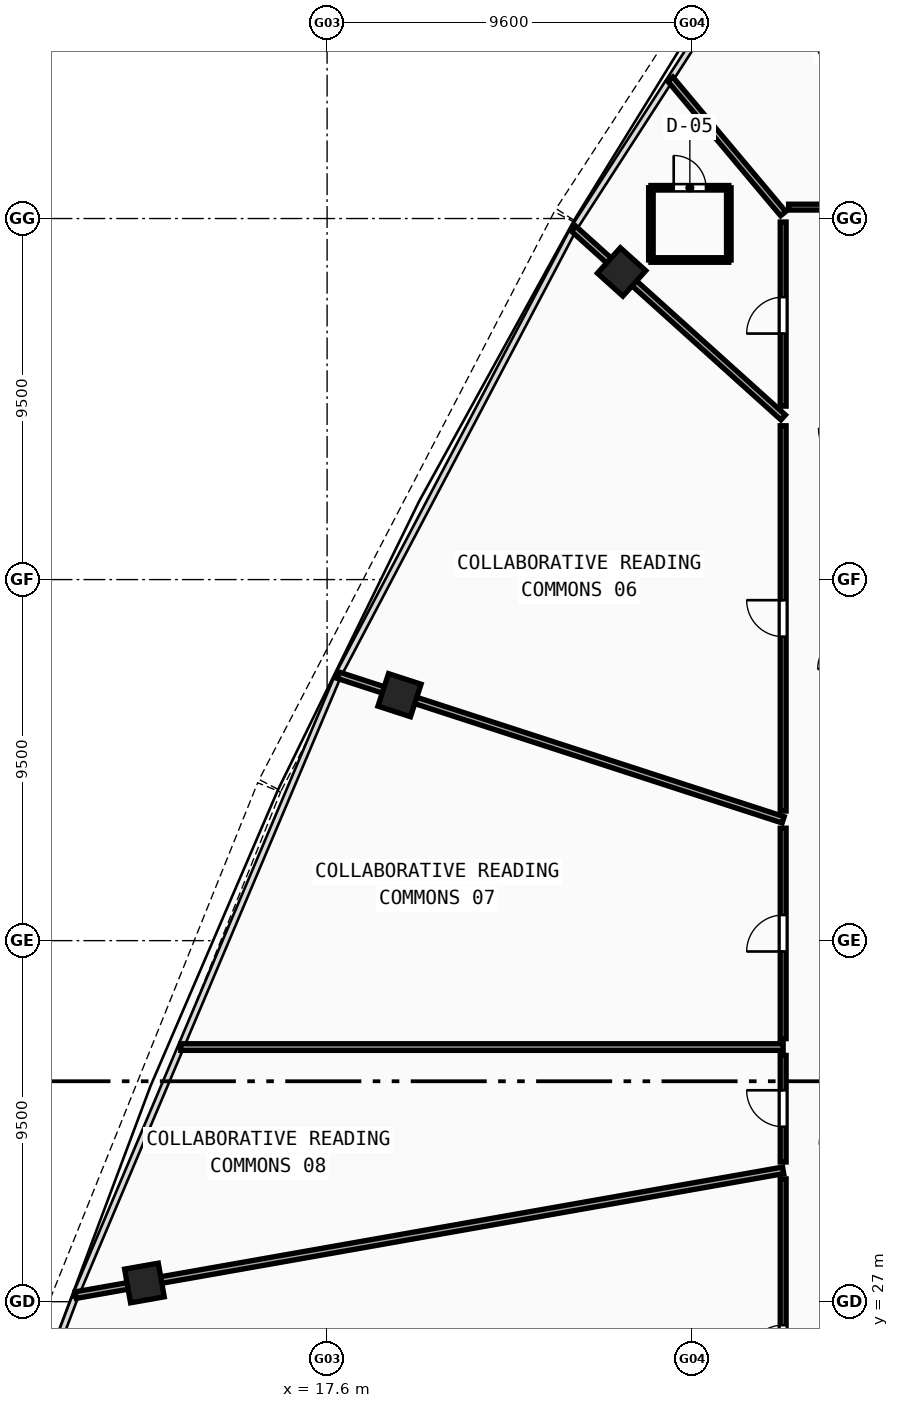
"""IFC4 building model, lengths in metres.
Left out: names, types, materials, properties, quantities, classifications, styles, units other than length and angle.
Written with IfcOpenShell. Run it as: python <this file> out.ifc"""

import sys

from ifc_helpers import new_model, si_unit, direction, frame, frame_2d, origin, origin_with_axes, origin_2d, place, context, subcontext, project, spatial, rectangle, hollow_rectangle, extrude, source, transform, mapped, element, fill, save


model = new_model("IFC4")
c1 = context("Model", 3, precision=1e-05, world=origin(), true_north=direction((0.0, 1.0)))
c2 = subcontext(c1, "Body", "Model", "MODEL_VIEW")
j1 = project(units=[si_unit("LENGTHUNIT", "METRE"), si_unit("PLANEANGLEUNIT", "RADIAN")], contexts=[c1])
p1 = place(None, origin())
s1 = spatial("IfcSite", under=j1, at=p1, CompositionType="ELEMENT")
p2 = place(p1, origin())
s2 = spatial("IfcBuilding", under=s1, at=p2, CompositionType="ELEMENT")
p3 = place(p2, frame((0.0, 0.0, 207.56)))
s3 = spatial("IfcBuildingStorey", under=s2, at=p3, CompositionType="ELEMENT", Elevation=207.56)
m1 = source(origin(), c2, "Body", "SweptSolid", [
    extrude(hollow_rectangle(XDim=0.9, YDim=0.9, WallThickness=0.036, at=origin_2d()), origin(), (0.0, 0.0, 1.0), 3.8),
])
for number, where, z_axis, x_axis in (
    (1, (25.349, 54.095, -0.26), (0.0, 0.0, 1.0), (-0.669, -0.743, 0.0)),
    (2, (19.505, 42.958, -0.26), (0.0, 0.0, 1.0), (-0.309, -0.951, 0.0)),
    (3, (12.793, 27.492, -0.26), (0.0, 0.0, 1.0), (0.174, -0.985, 0.0)),
):
    element("IfcColumn", number, at=place(p3, frame(where, z_axis=z_axis, x_axis=x_axis)), inside=s3, PredefinedType="COLUMN", context=c2, shape_type="MappedRepresentation", body=[
        mapped(m1, transform((0.0, 0.0, 0.0), scale=1.0)),
    ])
p4 = place(p3, frame((29.6, 55.628, 0.0), z_axis=(0.0, 0.0, 1.0), x_axis=(-0.642810353623, 0.766025358115, 0.0)))
e4 = element("IfcWall", 4, at=p4, inside=s3, PredefinedType="PARTITIONING", context=c2, shape_type="SweptSolid", body=[
    extrude(rectangle(XDim=4.621, YDim=0.175, at=frame_2d((2.31, 0.0))), origin(), (0.0, 0.0, 1.0), 2.89),
])
p5 = place(p3, frame((29.6, 50.267, 0.0), z_axis=(0.0, 0.0, 1.0), x_axis=(-0.743143583897, 0.669131985271, 0.0)))
e5 = element("IfcWall", 5, at=p5, inside=s3, PredefinedType="PARTITIONING", context=c2, shape_type="SweptSolid", body=[
    extrude(rectangle(XDim=7.419, YDim=0.175, at=frame_2d((3.709, 0.0))), origin(), (0.0, 0.0, 1.0), 2.89),
])
p6 = place(p3, frame((29.6, 39.678, 0.0), z_axis=(0.0, 0.0, 1.0), x_axis=(-0.951057676857, 0.309013422511, 0.0)))
e6 = element("IfcWall", 6, at=p6, inside=s3, PredefinedType="PARTITIONING", context=c2, shape_type="SweptSolid", body=[
    extrude(rectangle(XDim=12.31, YDim=0.175, at=frame_2d((6.155, 0.0))), origin(), (0.0, 0.0, 1.0), 2.89),
])
p7 = place(p3, frame((29.6, 33.7, 0.0), z_axis=(0.0, 0.0, 1.0), x_axis=(-1.0, 0.0, 0.0)))
e7 = element("IfcWall", 7, at=p7, inside=s3, PredefinedType="PARTITIONING", context=c2, shape_type="SweptSolid", body=[
    extrude(rectangle(XDim=15.851, YDim=0.175, at=frame_2d((7.925, 0.0))), origin(), (0.0, 0.0, 1.0), 2.89),
])
p8 = place(p3, frame((29.6, 30.456, 0.0), z_axis=(0.0, 0.0, 1.0), x_axis=(-0.984807864876, -0.173647543254, 0.0)))
e8 = element("IfcWall", 8, at=p8, inside=s3, PredefinedType="PARTITIONING", context=c2, shape_type="SweptSolid", body=[
    extrude(rectangle(XDim=18.902, YDim=0.175, at=frame_2d((9.451, 0.0))), origin(), (0.0, 0.0, 1.0), 2.89),
])
p9 = place(p3, frame((29.6, 21.8, 0.0), z_axis=(0.0, 0.0, 1.0), x_axis=(0.0, 1.0, 0.0)))
e9 = element("IfcWall", 9, at=p9, inside=s3, PredefinedType="PARTITIONING", context=c2, shape_type="SweptSolid", body=[
    extrude(rectangle(XDim=8.432, YDim=0.155, at=frame_2d((4.216, 0.0))), origin(), (0.0, 0.0, 1.0), 3.14),
])
p10 = place(p9, frame((3.623, 0.0, 0.0)))
e10 = element("IfcOpeningElement", 10, at=p10, cuts=e9, PredefinedType="OPENING", context=c2, shape_type="SweptSolid", body=[
    extrude(rectangle(XDim=0.96, YDim=2.12, at=frame_2d((0.48, 1.06))), frame((0.0, 0.087, 0.0), z_axis=(0.0, -1.0, 0.0), x_axis=(1.0, 0.0, 0.0)), (0.0, 0.0, 1.0), 0.175),
])
p11 = place(p3, frame((29.6, 30.675, 0.0), z_axis=(0.0, 0.0, 1.0), x_axis=(0.0, 1.0, 0.0)))
e11 = element("IfcWall", 11, at=p11, inside=s3, PredefinedType="PARTITIONING", context=c2, shape_type="SweptSolid", body=[
    extrude(rectangle(XDim=2.805, YDim=0.155, at=frame_2d((1.402, 0.0))), origin(), (0.0, 0.0, 1.0), 3.54),
])
p12 = place(p11, frame((0.927, 0.0, 0.0)))
e12 = element("IfcOpeningElement", 12, at=p12, cuts=e11, PredefinedType="OPENING", context=c2, shape_type="SweptSolid", body=[
    extrude(rectangle(XDim=0.96, YDim=2.12, at=frame_2d((0.48, 1.06))), frame((0.0, 0.087, 0.0), z_axis=(0.0, -1.0, 0.0), x_axis=(1.0, 0.0, 0.0)), (0.0, 0.0, 1.0), 0.175),
])
p13 = place(p3, frame((29.6, 33.92, 0.0), z_axis=(0.0, 0.0, 1.0), x_axis=(0.0, 1.0, 0.0)))
e13 = element("IfcWall", 13, at=p13, inside=s3, PredefinedType="PARTITIONING", context=c2, shape_type="SweptSolid", body=[
    extrude(rectangle(XDim=5.539, YDim=0.155, at=frame_2d((2.77, 0.0))), origin(), (0.0, 0.0, 1.0), 3.14),
])
p14 = place(p13, frame((2.294, 0.0, 0.0)))
e14 = element("IfcOpeningElement", 14, at=p14, cuts=e13, PredefinedType="OPENING", context=c2, shape_type="SweptSolid", body=[
    extrude(rectangle(XDim=0.96, YDim=2.12, at=frame_2d((0.48, 1.06))), frame((0.0, 0.087, 0.0), z_axis=(0.0, -1.0, 0.0), x_axis=(1.0, 0.0, 0.0)), (0.0, 0.0, 1.0), 0.175),
])
p15 = place(p3, frame((29.6, 39.91, 0.0), z_axis=(0.0, 0.0, 1.0), x_axis=(0.0, 1.0, 0.0)))
e15 = element("IfcWall", 15, at=p15, inside=s3, PredefinedType="PARTITIONING", context=c2, shape_type="SweptSolid", body=[
    extrude(rectangle(XDim=10.138, YDim=0.155, at=frame_2d((5.069, 0.0))), origin(), (0.0, 0.0, 1.0), 2.89),
])
p16 = place(p15, frame((4.588, 0.0, 0.0)))
e16 = element("IfcOpeningElement", 16, at=p16, cuts=e15, PredefinedType="OPENING", context=c2, shape_type="SweptSolid", body=[
    extrude(rectangle(XDim=0.96, YDim=2.12, at=frame_2d((0.48, 1.06))), frame((0.0, 0.087, 0.0), z_axis=(0.0, -1.0, 0.0), x_axis=(1.0, 0.0, 0.0)), (0.0, 0.0, 1.0), 0.175),
])
p17 = place(p3, frame((29.6, 50.563, 0.0), z_axis=(0.0, 0.0, 1.0), x_axis=(0.0, 1.0, 0.0)))
e17 = element("IfcWall", 17, at=p17, inside=s3, PredefinedType="PARTITIONING", context=c2, shape_type="SweptSolid", body=[
    extrude(rectangle(XDim=4.845, YDim=0.155, at=frame_2d((2.422, 0.0))), origin(), (0.0, 0.0, 1.0), 3.54),
])
p18 = place(p17, frame((1.909, 0.0, 0.0)))
e18 = element("IfcOpeningElement", 18, at=p18, cuts=e17, PredefinedType="OPENING", context=c2, shape_type="SweptSolid", body=[
    extrude(rectangle(XDim=0.96, YDim=2.12, at=frame_2d((0.48, 1.06))), frame((0.0, 0.087, 0.0), z_axis=(0.0, -1.0, 0.0), x_axis=(1.0, 0.0, 0.0)), (0.0, 0.0, 1.0), 0.175),
])
p19 = place(p3, frame((29.743, 55.8, 0.0), z_axis=(0.0, 0.0, 1.0), x_axis=(1.0, 0.0, 0.0)))
e19 = element("IfcWall", 19, at=p19, inside=s3, PredefinedType="PARTITIONING", context=c2, shape_type="SweptSolid", body=[
    extrude(rectangle(XDim=8.177, YDim=0.155, at=frame_2d((4.088, 0.0))), origin(), (0.0, 0.0, 1.0), 3.14),
])
p20 = place(p19, frame((3.646, 0.0, 0.0)))
e20 = element("IfcOpeningElement", 20, at=p20, cuts=e19, PredefinedType="OPENING", context=c2, shape_type="SweptSolid", body=[
    extrude(rectangle(XDim=0.96, YDim=2.12, at=frame_2d((0.48, 1.06))), frame((0.0, 0.087, 0.0), z_axis=(0.0, -1.0, 0.0), x_axis=(1.0, 0.0, 0.0)), (0.0, 0.0, 1.0), 0.175),
])
p21 = place(p3, frame((26.12, 54.409, 0.0), z_axis=(0.0, 0.0, 1.0), x_axis=(1.0, 0.0, 0.0)))
e21 = element("IfcWall", 21, at=p21, inside=s3, PredefinedType="PARTITIONING", context=c2, shape_type="SweptSolid", body=[
    extrude(rectangle(XDim=2.05, YDim=0.12, at=frame_2d((1.025, 0.0))), origin(), (0.0, 0.0, 1.0), 3.54),
])
p22 = place(p3, frame((28.17, 54.409, 0.0), z_axis=(0.0, 0.0, 1.0), x_axis=(0.0, 1.0, 0.0)))
e22 = element("IfcWall", 22, at=p22, inside=s3, PredefinedType="PARTITIONING", context=c2, shape_type="SweptSolid", body=[
    extrude(rectangle(XDim=1.9, YDim=0.12, at=frame_2d((0.95, 0.0))), origin(), (0.0, 0.0, 1.0), 3.54),
])
p23 = place(p3, frame((28.17, 56.309, 0.0), z_axis=(0.0, 0.0, 1.0), x_axis=(-1.0, 0.0, 0.0)))
e23 = element("IfcWall", 23, at=p23, inside=s3, PredefinedType="PARTITIONING", context=c2, shape_type="SweptSolid", body=[
    extrude(rectangle(XDim=2.05, YDim=0.12, at=frame_2d((1.025, 0.0))), origin(), (0.0, 0.0, 1.0), 2.89),
])
p24 = place(p23, frame((0.6, 0.0, 0.0)))
e24 = element("IfcOpeningElement", 24, at=p24, cuts=e23, PredefinedType="OPENING", context=c2, shape_type="SweptSolid", body=[
    extrude(rectangle(XDim=0.85, YDim=2.1, at=frame_2d((0.425, 1.05))), frame((0.0, 0.07, 0.0), z_axis=(0.0, -1.0, 0.0), x_axis=(1.0, 0.0, 0.0)), (0.0, 0.0, 1.0), 0.14),
])
p25 = place(p3, frame((26.12, 56.309, 0.0), z_axis=(0.0, 0.0, 1.0), x_axis=(0.0, -1.0, 0.0)))
e25 = element("IfcWall", 25, at=p25, inside=s3, PredefinedType="PARTITIONING", context=c2, shape_type="SweptSolid", body=[
    extrude(rectangle(XDim=1.9, YDim=0.12, at=frame_2d((0.95, 0.0))), origin(), (0.0, 0.0, 1.0), 2.89),
])
m2 = source(origin(), c2, "Body", "SweptSolid", [
    extrude(rectangle(XDim=0.96, YDim=2.12, at=frame_2d((0.48, 1.06))), frame((0.0, 0.025, 0.0), z_axis=(0.0, -1.0, 0.0), x_axis=(1.0, 0.0, 0.0)), (0.0, 0.0, 1.0), 0.05),
])
p26 = place(p18, origin_with_axes())
e26 = element("IfcDoor", 26, at=p26, inside=s3, OperationType="SINGLE_SWING_LEFT", PredefinedType="DOOR", context=c2, shape_type="MappedRepresentation", body=[
    mapped(m2, transform((0.0, 0.0, 0.0), scale=1.0)),
])
fill(e18, e26)
m3 = source(origin(), c2, "Body", "SweptSolid", [
    extrude(rectangle(XDim=0.85, YDim=2.1, at=frame_2d((0.425, 1.05))), frame((0.0, 0.025, 0.0), z_axis=(0.0, -1.0, 0.0), x_axis=(1.0, 0.0, 0.0)), (0.0, 0.0, 1.0), 0.05),
])
p27 = place(p24, frame((0.85, 0.0, 0.0), z_axis=(0.0, 0.0, 1.0), x_axis=(-1.0, 0.0, 0.0)))
e27 = element("IfcDoor", 27, at=p27, inside=s3, OperationType="SINGLE_SWING_LEFT", PredefinedType="DOOR", context=c2, shape_type="MappedRepresentation", body=[
    mapped(m3, transform((0.0, 0.0, 0.0), scale=1.0)),
])
fill(e24, e27)
p28 = place(p16, origin_with_axes())
e28 = element("IfcDoor", 28, at=p28, inside=s3, OperationType="SINGLE_SWING_RIGHT", PredefinedType="DOOR", context=c2, shape_type="MappedRepresentation", body=[
    mapped(m2, transform((0.0, 0.0, 0.0), scale=1.0)),
])
fill(e16, e28)
p29 = place(p14, origin_with_axes())
e29 = element("IfcDoor", 29, at=p29, inside=s3, OperationType="SINGLE_SWING_LEFT", PredefinedType="DOOR", context=c2, shape_type="MappedRepresentation", body=[
    mapped(m2, transform((0.0, 0.0, 0.0), scale=1.0)),
])
fill(e14, e29)
p30 = place(p12, origin_with_axes())
e30 = element("IfcDoor", 30, at=p30, inside=s3, OperationType="SINGLE_SWING_RIGHT", PredefinedType="DOOR", context=c2, shape_type="MappedRepresentation", body=[
    mapped(m2, transform((0.0, 0.0, 0.0), scale=1.0)),
])
fill(e12, e30)
p31 = place(p10, origin_with_axes())
e31 = element("IfcDoor", 31, at=p31, inside=s3, OperationType="SINGLE_SWING_LEFT", PredefinedType="DOOR", context=c2, shape_type="MappedRepresentation", body=[
    mapped(m2, transform((0.0, 0.0, 0.0), scale=1.0)),
])
fill(e10, e31)
save(model, sys.argv[1])
